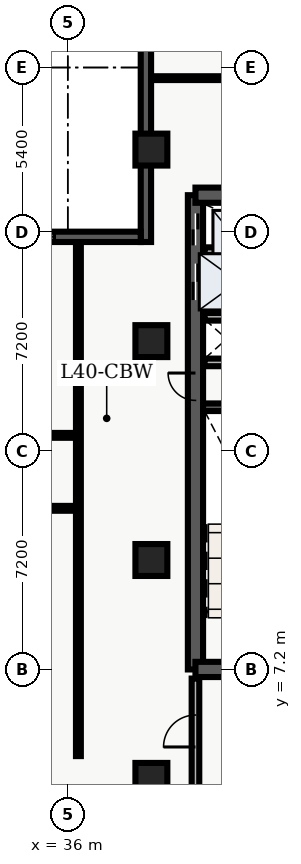
"""IFC4 building model, lengths in metres.
Left out: names, types, materials, properties, quantities, classifications, styles, units other than length and angle.
Written with IfcOpenShell. Run it as: python <this file> out.ifc"""

import sys

from ifc_helpers import new_model, entity, si_unit, converted_unit, direction, frame, origin_with_axes, origin_2d_with_axis, place, context, subcontext, project, spatial, polyline, rectangle, outline, extrude, element, fill, save


model = new_model("IFC4")
c1 = context("Model", 3, precision=1e-05, world=origin_with_axes(), true_north=direction((0.0, 1.0)))
c2 = subcontext(c1, "Body", "Model", "MODEL_VIEW")
j1 = project(units=[si_unit("LENGTHUNIT", "METRE"), converted_unit("PLANEANGLEUNIT", "DEGREE", entity("IfcPlaneAngleMeasure", 0.017), si_unit("PLANEANGLEUNIT", "RADIAN"), dimensions=[0, 0, 0, 0, 0, 0, 0])], contexts=[c1])
p1 = place(None, origin_with_axes())
s1 = spatial("IfcSite", under=j1, at=p1, CompositionType="ELEMENT")
p2 = place(p1, origin_with_axes())
s2 = spatial("IfcBuilding", under=s1, at=p2, CompositionType="ELEMENT")
p3 = place(p2, frame((0.0, 0.0, 164.1), z_axis=(0.0, 0.0, 1.0), x_axis=(1.0, 0.0, 0.0)))
s3 = spatial("IfcBuildingStorey", under=s2, at=p3, CompositionType="ELEMENT", Elevation=164.1)
p4 = place(p3, frame((40.2, 7.2, 0.0), z_axis=(0.0, 0.0, 1.0), x_axis=(0.0, 1.0, 0.0)))
e1 = element("IfcWall", 1, at=p4, inside=s3, PredefinedType="SHEAR", context=c2, shape_type="SweptSolid", body=[
    extrude(outline(polyline([(0.0, -0.25), (15.6, -0.25), (15.6, 0.25), (0.0, 0.25), (0.0, -0.25)])), origin_with_axes(), (0.0, 0.0, 1.0), 3.66),
])
p5 = place(p4, frame((14.475, 0.0, 0.0), z_axis=(0.0, 0.0, 1.0), x_axis=(1.0, 0.0, 0.0)))
e2 = element("IfcOpeningElement", 2, at=p5, cuts=e1, PredefinedType="OPENING", context=c2, shape_type="SweptSolid", body=[
    extrude(rectangle(XDim=1.05, YDim=0.52, at=origin_2d_with_axis()), origin_with_axes(), (0.0, 0.0, 1.0), 2.15),
])
p6 = place(p4, frame((12.75, 0.0, 0.0), z_axis=(0.0, 0.0, 1.0), x_axis=(1.0, 0.0, 0.0)))
e3 = element("IfcOpeningElement", 3, at=p6, cuts=e1, PredefinedType="OPENING", context=c2, shape_type="SweptSolid", body=[
    extrude(rectangle(XDim=1.2, YDim=0.52, at=origin_2d_with_axis()), origin_with_axes(), (0.0, 0.0, 1.0), 2.15),
])
p7 = place(p4, frame((9.3, 0.0, 0.0), z_axis=(0.0, 0.0, 1.0), x_axis=(1.0, 0.0, 0.0)))
e4 = element("IfcOpeningElement", 4, at=p7, cuts=e1, PredefinedType="OPENING", context=c2, shape_type="SweptSolid", body=[
    extrude(rectangle(XDim=0.9, YDim=0.52, at=origin_2d_with_axis()), origin_with_axes(), (0.0, 0.0, 1.0), 2.15),
])
p8 = place(p3, frame((40.2, 7.2, 0.0), z_axis=(0.0, 0.0, 1.0), x_axis=(1.0, 0.0, 0.0)))
e5 = element("IfcWall", 5, at=p8, inside=s3, PredefinedType="SHEAR", context=c2, shape_type="SweptSolid", body=[
    extrude(outline(polyline([(0.0, -0.25), (7.85, -0.25), (7.85, 0.25), (0.0, 0.25), (0.0, -0.25)])), origin_with_axes(), (0.0, 0.0, 1.0), 3.66),
])
p9 = place(p8, frame((2.175, 0.0, 0.0), z_axis=(0.0, 0.0, 1.0), x_axis=(1.0, 0.0, 0.0)))
e6 = element("IfcOpeningElement", 6, at=p9, cuts=e5, PredefinedType="OPENING", context=c2, shape_type="SweptSolid", body=[
    extrude(rectangle(XDim=1.05, YDim=0.52, at=origin_2d_with_axis()), origin_with_axes(), (0.0, 0.0, 1.0), 2.15),
])
p10 = place(p3, frame((40.2, 22.8, 0.0), z_axis=(0.0, 0.0, 1.0), x_axis=(1.0, 0.0, 0.0)))
e7 = element("IfcWall", 7, at=p10, inside=s3, PredefinedType="SHEAR", context=c2, shape_type="SweptSolid", body=[
    extrude(outline(polyline([(0.0, -0.25), (7.85, -0.25), (7.85, 0.25), (0.0, 0.25), (0.0, -0.25)])), origin_with_axes(), (0.0, 0.0, 1.0), 3.66),
])
p11 = place(p10, frame((5.775, 0.0, 0.0), z_axis=(0.0, 0.0, 1.0), x_axis=(1.0, 0.0, 0.0)))
e8 = element("IfcOpeningElement", 8, at=p11, cuts=e7, PredefinedType="OPENING", context=c2, shape_type="SweptSolid", body=[
    extrude(rectangle(XDim=1.05, YDim=0.52, at=origin_2d_with_axis()), origin_with_axes(), (0.0, 0.0, 1.0), 2.15),
])
p12 = place(p3, frame((40.45, 15.825, 0.0), z_axis=(0.0, 0.0, 1.0), x_axis=(1.0, 0.0, 0.0)))
e9 = element("IfcWall", 9, at=p12, inside=s3, PredefinedType="SHEAR", context=c2, shape_type="SweptSolid", body=[
    extrude(outline(polyline([(0.0, -0.125), (3.55, -0.125), (3.55, 0.125), (0.0, 0.125), (0.0, -0.125)])), origin_with_axes(), (0.0, 0.0, 1.0), 3.66),
])
p13 = place(p3, frame((40.5, 17.3, 0.0), z_axis=(0.0, 0.0, 1.0), x_axis=(1.0, 0.0, 0.0)))
e10 = element("IfcWall", 10, at=p13, inside=s3, PredefinedType="SOLIDWALL", context=c2, shape_type="SweptSolid", body=[
    extrude(outline(polyline([(0.0, -0.125), (3.5, -0.125), (3.5, 0.125), (0.0, 0.125), (0.0, -0.125)])), origin_with_axes(), (0.0, 0.0, 1.0), 2.7),
])
p14 = place(p13, frame((2.4, 0.0, 0.0), z_axis=(0.0, 0.0, 1.0), x_axis=(1.0, 0.0, 0.0)))
e11 = element("IfcOpeningElement", 11, at=p14, cuts=e10, PredefinedType="OPENING", context=c2, shape_type="SweptSolid", body=[
    extrude(rectangle(XDim=0.9, YDim=0.27, at=origin_2d_with_axis()), origin_with_axes(), (0.0, 0.0, 1.0), 2.15),
])
p15 = place(p3, frame((40.5, 18.8, 0.0), z_axis=(0.0, 0.0, 1.0), x_axis=(1.0, 0.0, 0.0)))
e12 = element("IfcWall", 12, at=p15, inside=s3, PredefinedType="SOLIDWALL", context=c2, shape_type="SweptSolid", body=[
    extrude(outline(polyline([(0.0, -0.125), (3.5, -0.125), (3.5, 0.125), (0.0, 0.125), (0.0, -0.125)])), origin_with_axes(), (0.0, 0.0, 1.0), 2.7),
])
p16 = place(p3, frame((40.2, 3.1, 0.0), z_axis=(0.0, 0.0, 1.0), x_axis=(0.0, 1.0, 0.0)))
e13 = element("IfcWall", 13, at=p16, inside=s3, PredefinedType="SOLIDWALL", context=c2, shape_type="SweptSolid", body=[
    extrude(outline(polyline([(0.0, -0.125), (3.8, -0.125), (3.8, 0.125), (0.0, 0.125), (0.0, -0.125)])), origin_with_axes(), (0.0, 0.0, 1.0), 2.7),
])
p17 = place(p16, frame((2.075, 0.0, 0.0), z_axis=(0.0, 0.0, 1.0), x_axis=(1.0, 0.0, 0.0)))
e14 = element("IfcOpeningElement", 14, at=p17, cuts=e13, PredefinedType="OPENING", context=c2, shape_type="SweptSolid", body=[
    extrude(rectangle(XDim=1.05, YDim=0.27, at=origin_2d_with_axis()), origin_with_axes(), (0.0, 0.0, 1.0), 2.15),
])
for number, where, z_axis, x_axis in (
    (15, (38.75, 3.6, 0.0), (0.0, 0.0, 1.0), (1.0, 0.0, 0.0)),
    (16, (38.75, 10.8, 0.0), (0.0, 0.0, 1.0), (1.0, 0.0, 0.0)),
    (17, (38.75, 18.0, 0.0), (0.0, 0.0, 1.0), (1.0, 0.0, 0.0)),
    (18, (38.75, 24.3, 0.0), (0.0, 0.0, 1.0), (1.0, 0.0, 0.0)),
):
    element("IfcColumn", number, at=place(p3, frame(where, z_axis=z_axis, x_axis=x_axis)), inside=s3, PredefinedType="COLUMN", context=c2, shape_type="SweptSolid", body=[
        extrude(rectangle(XDim=1.05, YDim=1.05, at=origin_2d_with_axis()), origin_with_axes(), (0.0, 0.0, 1.0), 3.9),
    ])
p18 = place(p3, frame((40.5, 20.96, 0.0), z_axis=(0.0, 0.0, 1.0), x_axis=(1.0, 0.0, 0.0)))
e19 = element("IfcWall", 19, at=p18, inside=s3, PredefinedType="SOLIDWALL", context=c2, shape_type="SweptSolid", body=[
    extrude(outline(polyline([(0.0, -0.125), (3.5, -0.125), (3.5, 0.125), (0.0, 0.125), (0.0, -0.125)])), origin_with_axes(), (0.0, 0.0, 1.0), 2.7),
])
p19 = place(p3, frame((21.15, 12.5, 0.0), z_axis=(0.0, 0.0, 1.0), x_axis=(1.0, 0.0, 0.0)))
e20 = element("IfcWall", 20, at=p19, inside=s3, PredefinedType="PARTITIONING", context=c2, shape_type="SweptSolid", body=[
    extrude(outline(polyline([(0.0, -0.08), (15.2, -0.08), (15.2, 0.08), (0.0, 0.08), (0.0, -0.08)])), origin_with_axes(), (0.0, 0.0, 1.0), 2.7),
])
p20 = place(p19, frame((3.583, 0.0, 0.0), z_axis=(0.0, 0.0, 1.0), x_axis=(1.0, 0.0, 0.0)))
e21 = element("IfcOpeningElement", 21, at=p20, cuts=e20, PredefinedType="OPENING", context=c2, shape_type="SweptSolid", body=[
    extrude(rectangle(XDim=1.0, YDim=0.18, at=origin_2d_with_axis()), origin_with_axes(), (0.0, 0.0, 1.0), 2.15),
])
p21 = place(p19, frame((11.053, 0.0, 0.0), z_axis=(0.0, 0.0, 1.0), x_axis=(1.0, 0.0, 0.0)))
e22 = element("IfcOpeningElement", 22, at=p21, cuts=e20, PredefinedType="OPENING", context=c2, shape_type="SweptSolid", body=[
    extrude(rectangle(XDim=1.2, YDim=0.18, at=origin_2d_with_axis()), origin_with_axes(), (0.0, 0.0, 1.0), 2.2),
])
p22 = place(p3, frame((21.15, 14.9, 0.0), z_axis=(0.0, 0.0, 1.0), x_axis=(1.0, 0.0, 0.0)))
e23 = element("IfcWall", 23, at=p22, inside=s3, PredefinedType="PARTITIONING", context=c2, shape_type="SweptSolid", body=[
    extrude(outline(polyline([(0.0, -0.08), (15.2, -0.08), (15.2, 0.08), (0.0, 0.08), (0.0, -0.08)])), origin_with_axes(), (0.0, 0.0, 1.0), 2.7),
])
p23 = place(p22, frame((1.758, 0.0, 0.0), z_axis=(0.0, 0.0, 1.0), x_axis=(1.0, 0.0, 0.0)))
e24 = element("IfcOpeningElement", 24, at=p23, cuts=e23, PredefinedType="OPENING", context=c2, shape_type="SweptSolid", body=[
    extrude(rectangle(XDim=1.0, YDim=0.18, at=origin_2d_with_axis()), origin_with_axes(), (0.0, 0.0, 1.0), 2.15),
])
p24 = place(p22, frame((4.893, 0.0, 0.0), z_axis=(0.0, 0.0, 1.0), x_axis=(1.0, 0.0, 0.0)))
e25 = element("IfcOpeningElement", 25, at=p24, cuts=e23, PredefinedType="OPENING", context=c2, shape_type="SweptSolid", body=[
    extrude(rectangle(XDim=1.0, YDim=0.18, at=origin_2d_with_axis()), origin_with_axes(), (0.0, 0.0, 1.0), 2.15),
])
p25 = place(p22, frame((8.555, 0.0, 0.0), z_axis=(0.0, 0.0, 1.0), x_axis=(1.0, 0.0, 0.0)))
e26 = element("IfcOpeningElement", 26, at=p25, cuts=e23, PredefinedType="OPENING", context=c2, shape_type="SweptSolid", body=[
    extrude(rectangle(XDim=1.0, YDim=0.18, at=origin_2d_with_axis()), origin_with_axes(), (0.0, 0.0, 1.0), 2.15),
])
p26 = place(p22, frame((12.889, 0.0, 0.0), z_axis=(0.0, 0.0, 1.0), x_axis=(1.0, 0.0, 0.0)))
e27 = element("IfcOpeningElement", 27, at=p26, cuts=e23, PredefinedType="OPENING", context=c2, shape_type="SweptSolid", body=[
    extrude(rectangle(XDim=1.0, YDim=0.18, at=origin_2d_with_axis()), origin_with_axes(), (0.0, 0.0, 1.0), 2.15),
])
p27 = place(p3, frame((36.35, 4.35, 0.0), z_axis=(0.0, 0.0, 1.0), x_axis=(0.0, 1.0, 0.0)))
e28 = element("IfcWall", 28, at=p27, inside=s3, PredefinedType="PARTITIONING", context=c2, shape_type="SweptSolid", body=[
    extrude(outline(polyline([(0.0, -0.08), (16.95, -0.08), (16.95, 0.08), (0.0, 0.08), (0.0, -0.08)])), origin_with_axes(), (0.0, 0.0, 1.0), 2.7),
])
p28 = place(p3, frame((38.735, 26.65, 0.0), z_axis=(0.0, 0.0, 1.0), x_axis=(1.0, 0.0, 0.0)))
e29 = element("IfcWall", 29, at=p28, inside=s3, PredefinedType="PARTITIONING", context=c2, shape_type="SweptSolid", body=[
    extrude(outline(polyline([(0.0, -0.062), (20.905, -0.062), (20.905, 0.062), (0.0, 0.062), (0.0, -0.062)])), origin_with_axes(), (0.0, 0.0, 1.0), 2.7),
])
p29 = place(p28, frame((4.265, 0.0, 0.0), z_axis=(0.0, 0.0, 1.0), x_axis=(1.0, 0.0, 0.0)))
e30 = element("IfcOpeningElement", 30, at=p29, cuts=e29, PredefinedType="OPENING", context=c2, shape_type="SweptSolid", body=[
    extrude(rectangle(XDim=1.0, YDim=0.145, at=origin_2d_with_axis()), origin_with_axes(), (0.0, 0.0, 1.0), 2.15),
])
p30 = place(p3, frame((38.57, 21.26, 0.0), z_axis=(0.0, 0.0, 1.0), x_axis=(0.0, 1.0, 0.0)))
e31 = element("IfcWall", 31, at=p30, inside=s3, PredefinedType="SOLIDWALL", context=c2, shape_type="SweptSolid", body=[
    extrude(outline(polyline([(0.0, -0.17), (7.54, -0.17), (7.54, 0.17), (0.0, 0.17), (0.0, -0.17)])), origin_with_axes(), (0.0, 0.0, 1.0), 3.66),
])
p31 = place(p3, frame((23.479, 21.43, 0.0), z_axis=(0.0, 0.0, 1.0), x_axis=(1.0, 0.0, 0.0)))
e32 = element("IfcWall", 32, at=p31, inside=s3, PredefinedType="SOLIDWALL", context=c2, shape_type="SweptSolid", body=[
    extrude(outline(polyline([(0.0, -0.17), (14.921, -0.17), (14.921, 0.17), (0.0, 0.17), (0.0, -0.17)])), origin_with_axes(), (0.0, 0.0, 1.0), 3.66),
])
p32 = place(p31, frame((2.437, 0.0, 0.45), z_axis=(0.0, 0.0, 1.0), x_axis=(1.0, 0.0, 0.0)))
e33 = element("IfcOpeningElement", 33, at=p32, cuts=e32, PredefinedType="OPENING", context=c2, shape_type="SweptSolid", body=[
    extrude(rectangle(XDim=1.8, YDim=0.36, at=origin_2d_with_axis()), origin_with_axes(), (0.0, 0.0, 1.0), 2.1),
])
p33 = place(p31, frame((6.61, 0.0, 0.45), z_axis=(0.0, 0.0, 1.0), x_axis=(1.0, 0.0, 0.0)))
e34 = element("IfcOpeningElement", 34, at=p33, cuts=e32, PredefinedType="OPENING", context=c2, shape_type="SweptSolid", body=[
    extrude(rectangle(XDim=1.8, YDim=0.36, at=origin_2d_with_axis()), origin_with_axes(), (0.0, 0.0, 1.0), 2.1),
])
p34 = place(p31, frame((11.184, 0.0, 0.45), z_axis=(0.0, 0.0, 1.0), x_axis=(1.0, 0.0, 0.0)))
e35 = element("IfcOpeningElement", 35, at=p34, cuts=e32, PredefinedType="OPENING", context=c2, shape_type="SweptSolid", body=[
    extrude(rectangle(XDim=1.8, YDim=0.36, at=origin_2d_with_axis()), origin_with_axes(), (0.0, 0.0, 1.0), 2.1),
])
p35 = place(p4, frame((14.475, 0.0, 0.0), z_axis=(0.0, 0.0, 1.0), x_axis=(1.0, 0.0, 0.0)))
e36 = element("IfcDoor", 36, at=p35, inside=s3, OperationType="SLIDING_TO_RIGHT", PredefinedType="DOOR", context=c2, shape_type="SweptSolid", body=[
    extrude(rectangle(XDim=1.05, YDim=0.09, at=origin_2d_with_axis()), origin_with_axes(), (0.0, 0.0, 1.0), 2.15),
])
fill(e2, e36)
p36 = place(p4, frame((12.75, 0.0, 0.0), z_axis=(0.0, 0.0, 1.0), x_axis=(1.0, 0.0, 0.0)))
e37 = element("IfcDoor", 37, at=p36, inside=s3, OperationType="DOUBLE_DOOR_SLIDING", PredefinedType="DOOR", context=c2, shape_type="SweptSolid", body=[
    extrude(rectangle(XDim=1.2, YDim=0.09, at=origin_2d_with_axis()), origin_with_axes(), (0.0, 0.0, 1.0), 2.15),
])
fill(e3, e37)
p37 = place(p4, frame((9.3, 0.0, 0.0), z_axis=(0.0, 0.0, 1.0), x_axis=(1.0, 0.0, 0.0)))
e38 = element("IfcDoor", 38, at=p37, inside=s3, OperationType="SINGLE_SWING_RIGHT", PredefinedType="DOOR", context=c2, shape_type="SweptSolid", body=[
    extrude(rectangle(XDim=0.9, YDim=0.09, at=origin_2d_with_axis()), origin_with_axes(), (0.0, 0.0, 1.0), 2.15),
])
fill(e4, e38)
p38 = place(p16, frame((2.075, 0.0, 0.0), z_axis=(0.0, 0.0, 1.0), x_axis=(1.0, 0.0, 0.0)))
e39 = element("IfcDoor", 39, at=p38, inside=s3, OperationType="SINGLE_SWING_LEFT", PredefinedType="DOOR", context=c2, shape_type="SweptSolid", body=[
    extrude(rectangle(XDim=1.05, YDim=0.09, at=origin_2d_with_axis()), origin_with_axes(), (0.0, 0.0, 1.0), 2.15),
])
fill(e14, e39)
p39 = place(p31, frame((11.184, 0.0, 0.45), z_axis=(0.0, 0.0, 1.0), x_axis=(1.0, 0.0, 0.0)))
e40 = element("IfcWindow", 40, at=p39, inside=s3, PredefinedType="WINDOW", context=c2, shape_type="SweptSolid", body=[
    extrude(rectangle(XDim=1.8, YDim=0.09, at=origin_2d_with_axis()), origin_with_axes(), (0.0, 0.0, 1.0), 2.1),
])
fill(e35, e40)
save(model, sys.argv[1])
